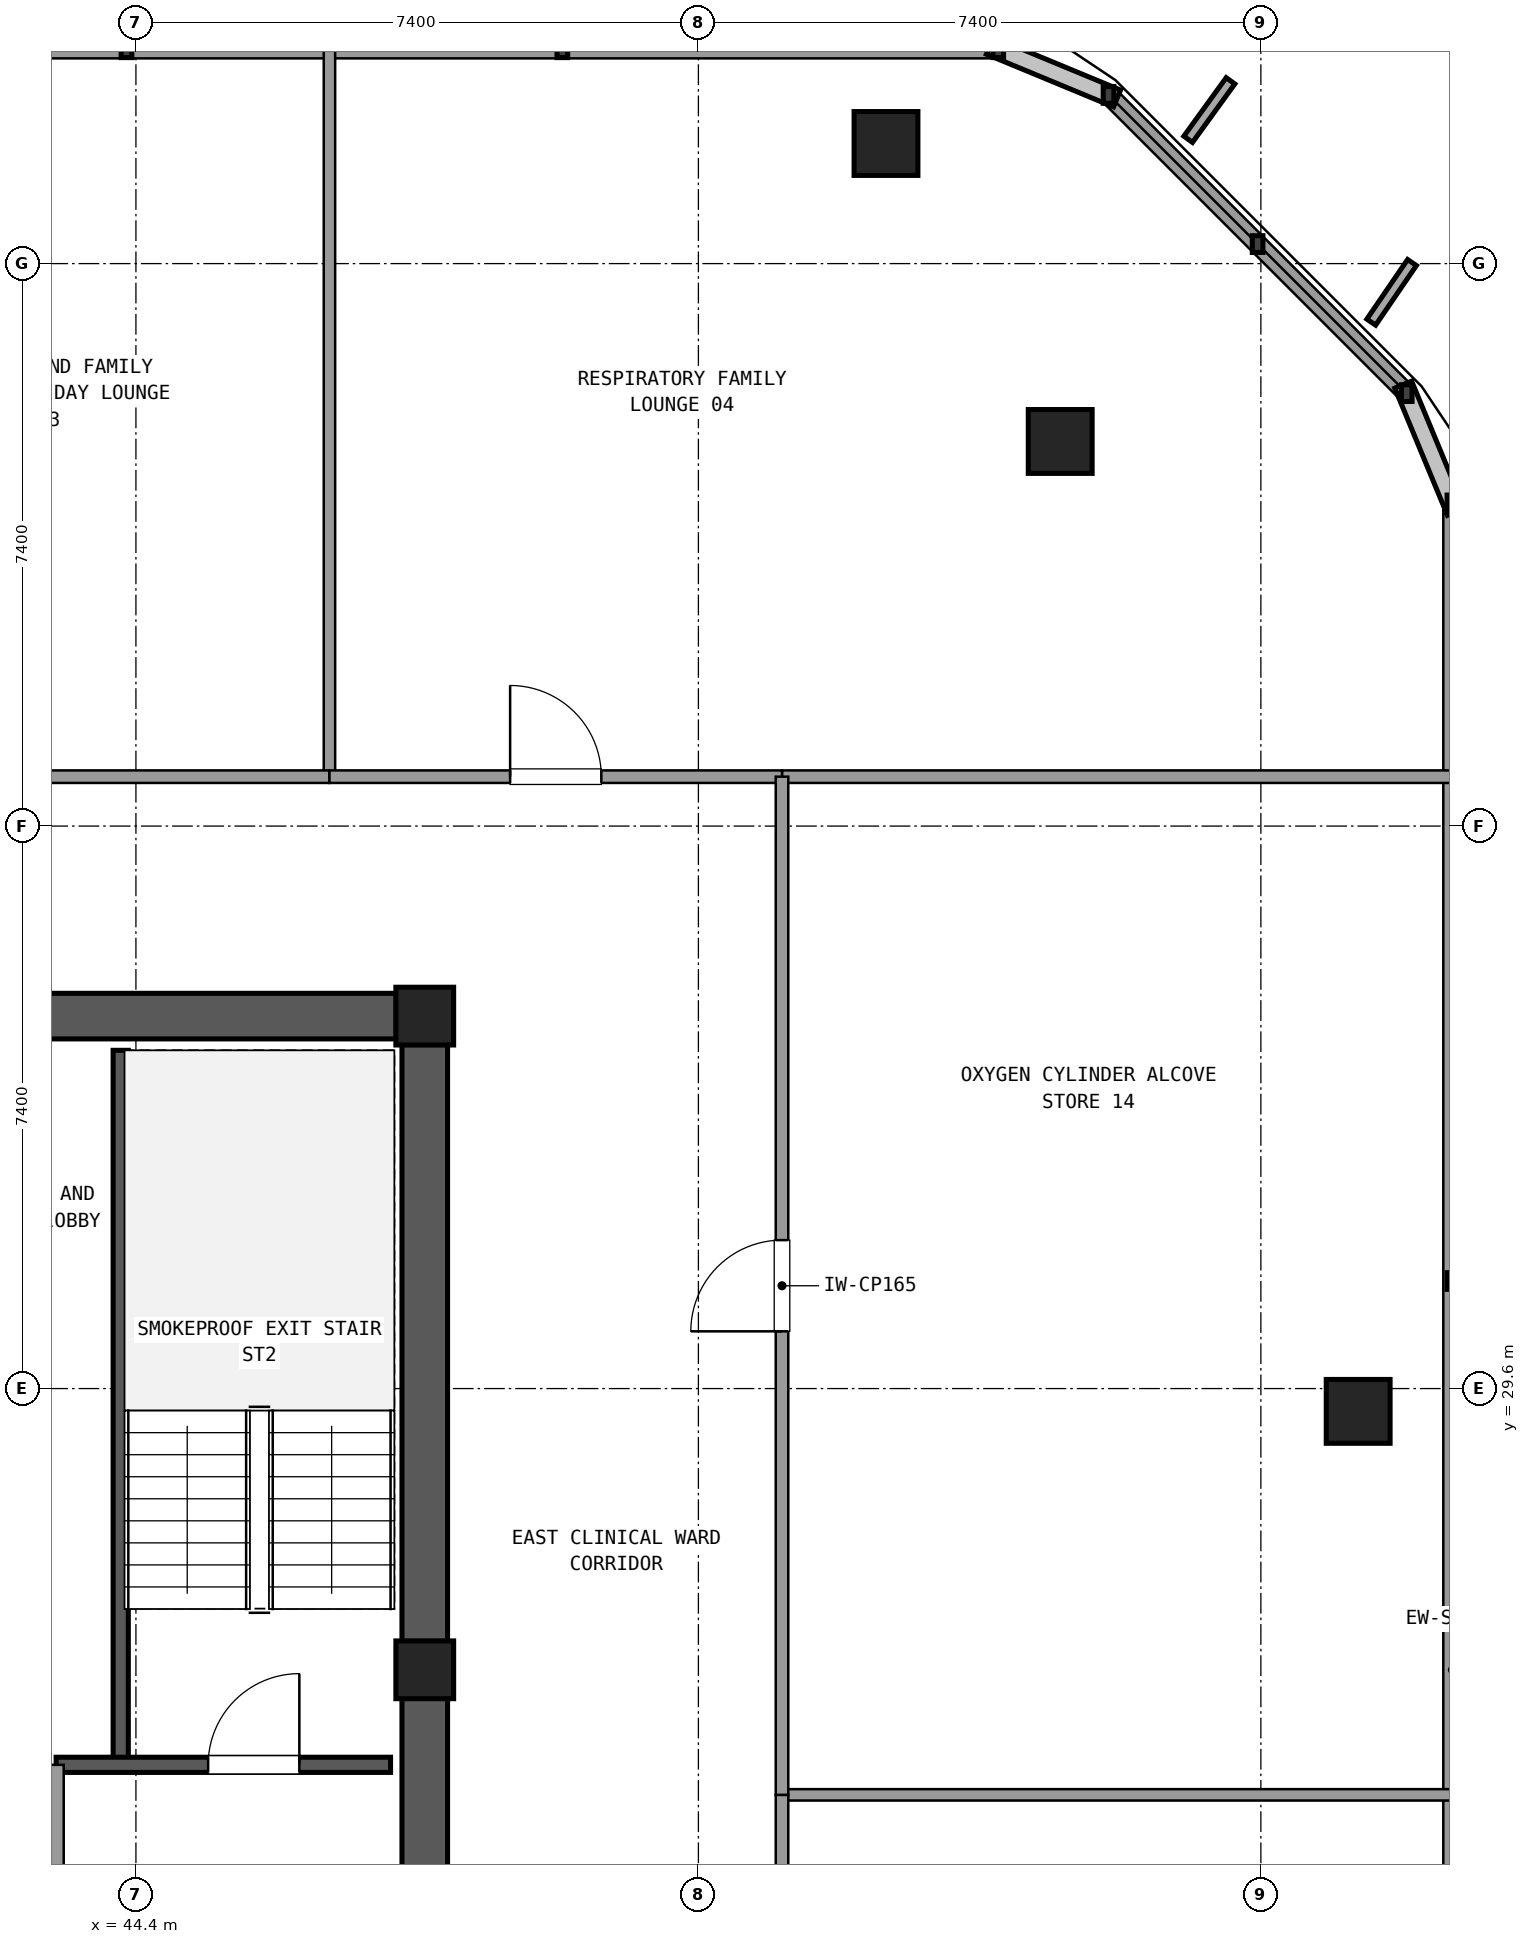
"""IFC4 building model, lengths in metres.
Left out: names, types, materials, properties, quantities, classifications, styles, units other than length and angle.
Written with IfcOpenShell. Run it as: python <this file> out.ifc"""

import sys

from ifc_helpers import new_model, si_unit, direction, frame, frame_2d, origin, origin_2d, place, context, subcontext, project, spatial, rectangle, extrude, element, fill, save


model = new_model("IFC4")
c1 = context("Model", 3, precision=1e-05, world=origin(), true_north=direction((0.0, 1.0)))
c2 = subcontext(c1, "Body", "Model", "MODEL_VIEW")
j1 = project(units=[si_unit("LENGTHUNIT", "METRE"), si_unit("PLANEANGLEUNIT", "RADIAN")], contexts=[c1])
p1 = place(None, origin())
s1 = spatial("IfcSite", under=j1, at=p1, CompositionType="ELEMENT")
p2 = place(p1, origin())
s2 = spatial("IfcBuilding", under=s1, at=p2, CompositionType="ELEMENT")
p3 = place(p2, frame((0.0, 0.0, 268.02)))
s3 = spatial("IfcBuildingStorey", under=s2, at=p3, CompositionType="ELEMENT", Elevation=268.02)
for number, where, z_axis, x_axis in (
    (1, (48.2, 25.9, 0.0), (0.0, 0.0, 1.0), (1.0, 0.0, 0.0)),
    (2, (48.2, 34.5, 0.0), (0.0, 0.0, 1.0), (1.0, 0.0, 0.0)),
):
    element("IfcColumn", number, at=place(p3, frame(where, z_axis=z_axis, x_axis=x_axis)), inside=s3, PredefinedType="COLUMN", context=c2, shape_type="SweptSolid", body=[
        extrude(rectangle(XDim=0.76, YDim=0.76, at=origin_2d()), origin(), (0.0, 0.0, 1.0), 3.6),
    ])
p4 = place(p3, frame((48.2, 17.675, 0.0), z_axis=(0.0, 0.0, 1.0), x_axis=(0.0, 1.0, 0.0)))
e3 = element("IfcWall", 3, at=p4, inside=s3, PredefinedType="SHEAR", context=c2, shape_type="SweptSolid", body=[
    extrude(rectangle(XDim=7.85, YDim=0.6, at=frame_2d((3.925, 0.0))), origin(), (0.0, 0.0, 1.0), 3.32),
])
p5 = place(p4, frame((4.375, 0.0, 0.0)))
e4 = element("IfcOpeningElement", 4, at=p5, cuts=e3, PredefinedType="OPENING", context=c2, shape_type="SweptSolid", body=[
    extrude(rectangle(XDim=1.2, YDim=2.15, at=frame_2d((0.6, 1.075))), frame((0.0, 0.31, 0.0), z_axis=(0.0, -1.0, 0.0), x_axis=(1.0, 0.0, 0.0)), (0.0, 0.0, 1.0), 0.62),
])
p6 = place(p3, frame((48.2, 26.275, 0.0), z_axis=(0.0, 0.0, 1.0), x_axis=(0.0, 1.0, 0.0)))
e5 = element("IfcWall", 5, at=p6, inside=s3, PredefinedType="SHEAR", context=c2, shape_type="SweptSolid", body=[
    extrude(rectangle(XDim=7.85, YDim=0.6, at=frame_2d((3.925, 0.0))), origin(), (0.0, 0.0, 1.0), 3.32),
])
p7 = place(p3, frame((47.825, 34.5, 0.0), z_axis=(0.0, 0.0, 1.0), x_axis=(-1.0, 0.0, 0.0)))
e6 = element("IfcWall", 6, at=p7, inside=s3, PredefinedType="SHEAR", context=c2, shape_type="SweptSolid", body=[
    extrude(rectangle(XDim=10.45, YDim=0.6, at=frame_2d((5.225, 0.0))), origin(), (0.0, 0.0, 1.0), 3.32),
])
p8 = place(p7, frame((4.725, 0.0, 0.0)))
e7 = element("IfcOpeningElement", 7, at=p8, cuts=e6, PredefinedType="OPENING", context=c2, shape_type="SweptSolid", body=[
    extrude(rectangle(XDim=1.6, YDim=2.2, at=frame_2d((0.8, 1.1))), frame((0.0, 0.31, 0.0), z_axis=(0.0, -1.0, 0.0), x_axis=(1.0, 0.0, 0.0)), (0.0, 0.0, 1.0), 0.62),
])
for number, where, z_axis, x_axis in (
    (8, (60.48, 29.3, 0.0), (0.0, 0.0, 1.0), (1.0, 0.0, 0.0)),
    (9, (56.56, 42.06, 0.0), (0.0, 0.0, 1.0), (1.0, 0.0, 0.0)),
    (10, (54.268, 45.98, 0.0), (0.0, 0.0, 1.0), (1.0, 0.0, 0.0)),
):
    element("IfcColumn", number, at=place(p3, frame(where, z_axis=z_axis, x_axis=x_axis)), inside=s3, PredefinedType="COLUMN", context=c2, shape_type="SweptSolid", body=[
        extrude(rectangle(XDim=0.84, YDim=0.84, at=origin_2d()), origin(), (0.0, 0.0, 1.0), 3.6),
    ])
p9 = place(p3, frame((61.72, 10.555, 0.0), z_axis=(0.0, 0.0, 1.0), x_axis=(0.0, 1.0, 0.0)))
e11 = element("IfcWall", 11, at=p9, inside=s3, PredefinedType="SOLIDWALL", context=c2, shape_type="SweptSolid", body=[
    extrude(rectangle(XDim=30.69, YDim=0.24, at=frame_2d((15.345, 0.0))), origin(), (0.0, 0.0, 1.0), 0.85),
])
p10 = place(p3, frame((61.119, 42.696, 0.0), z_axis=(0.0, 0.0, 1.0), x_axis=(-0.707106781187, 0.707106781187, 0.0)))
e12 = element("IfcWall", 12, at=p10, inside=s3, PredefinedType="SOLIDWALL", context=c2, shape_type="SweptSolid", body=[
    extrude(rectangle(XDim=5.548, YDim=0.24, at=frame_2d((2.774, 0.0))), origin(), (0.0, 0.0, 1.0), 0.85),
])
p11 = place(p3, frame((55.745, 47.22, 0.0), z_axis=(0.0, 0.0, 1.0), x_axis=(-1.0, 0.0, 0.0)))
e13 = element("IfcWall", 13, at=p11, inside=s3, PredefinedType="SOLIDWALL", context=c2, shape_type="SweptSolid", body=[
    extrude(rectangle(XDim=17.204, YDim=0.24, at=frame_2d((8.602, 0.0))), origin(), (0.0, 0.0, 1.0), 0.85),
])
p12 = place(p3, frame((44.2, 24.65, 0.0), z_axis=(0.0, 0.0, 1.0), x_axis=(0.0, 1.0, 0.0)))
e14 = element("IfcWall", 14, at=p12, inside=s3, PredefinedType="SHEAR", context=c2, shape_type="SweptSolid", body=[
    extrude(rectangle(XDim=9.4, YDim=0.2, at=frame_2d((4.7, 0.0))), origin(), (0.0, 0.0, 1.0), 3.32),
])
p13 = place(p3, frame((43.35, 24.65, 0.0), z_axis=(0.0, 0.0, 1.0), x_axis=(1.0, 0.0, 0.0)))
e15 = element("IfcWall", 15, at=p13, inside=s3, PredefinedType="SHEAR", context=c2, shape_type="SweptSolid", body=[
    extrude(rectangle(XDim=4.4, YDim=0.2, at=frame_2d((2.2, 0.0))), origin(), (0.0, 0.0, 1.0), 3.32),
])
p14 = place(p13, frame((2.0, 0.0, 0.0)))
e16 = element("IfcOpeningElement", 16, at=p14, cuts=e15, PredefinedType="OPENING", context=c2, shape_type="SweptSolid", body=[
    extrude(rectangle(XDim=1.2, YDim=2.15, at=frame_2d((0.6, 1.075))), frame((0.0, 0.11, 0.0), z_axis=(0.0, -1.0, 0.0), x_axis=(1.0, 0.0, 0.0)), (0.0, 0.0, 1.0), 0.22),
])
p15 = place(p3, frame((43.35, 17.75, 0.0), z_axis=(0.0, 0.0, 1.0), x_axis=(0.0, 1.0, 0.0)))
e17 = element("IfcWall", 17, at=p15, inside=s3, PredefinedType="SOLIDWALL", context=c2, shape_type="SweptSolid", body=[
    extrude(rectangle(XDim=6.9, YDim=0.2, at=frame_2d((3.45, 0.0))), origin(), (0.0, 0.0, 1.0), 2.61),
])
p16 = place(p15, frame((4.15, 0.0, 0.0)))
e18 = element("IfcOpeningElement", 18, at=p16, cuts=e17, PredefinedType="OPENING", context=c2, shape_type="SweptSolid", body=[
    extrude(rectangle(XDim=1.2, YDim=2.15, at=frame_2d((0.6, 1.075))), frame((0.0, 0.11, 0.0), z_axis=(0.0, -1.0, 0.0), x_axis=(1.0, 0.0, 0.0)), (0.0, 0.0, 1.0), 0.22),
])
p17 = place(p3, frame((52.9, 37.65, 0.0), z_axis=(0.0, 0.0, 1.0), x_axis=(1.0, 0.0, 0.0)))
e19 = element("IfcWall", 19, at=p17, inside=s3, PredefinedType="PARTITIONING", context=c2, shape_type="SweptSolid", body=[
    extrude(rectangle(XDim=8.8, YDim=0.165, at=frame_2d((4.4, 0.0))), origin(), (0.0, 0.0, 1.0), 2.61),
])
p18 = place(p3, frame((46.946, 37.65, 0.0), z_axis=(0.0, 0.0, 1.0), x_axis=(0.0, 1.0, 0.0)))
e20 = element("IfcWall", 20, at=p18, inside=s3, PredefinedType="PARTITIONING", context=c2, shape_type="SweptSolid", body=[
    extrude(rectangle(XDim=9.55, YDim=0.15, at=frame_2d((4.775, 0.0))), origin(), (0.0, 0.0, 1.0), 2.61),
])
p19 = place(p3, frame((35.2, 37.65, 0.0), z_axis=(0.0, 0.0, 1.0), x_axis=(1.0, 0.0, 0.0)))
e21 = element("IfcWall", 21, at=p19, inside=s3, PredefinedType="PARTITIONING", context=c2, shape_type="SweptSolid", body=[
    extrude(rectangle(XDim=11.746, YDim=0.165, at=frame_2d((5.873, 0.0))), origin(), (0.0, 0.0, 1.0), 2.61),
])
p20 = place(p19, frame((5.273, 0.0, 0.0)))
e22 = element("IfcOpeningElement", 22, at=p20, cuts=e21, PredefinedType="OPENING", context=c2, shape_type="SweptSolid", body=[
    extrude(rectangle(XDim=1.2, YDim=2.15, at=frame_2d((0.6, 1.075))), frame((0.0, 0.093, 0.0), z_axis=(0.0, -1.0, 0.0), x_axis=(1.0, 0.0, 0.0)), (0.0, 0.0, 1.0), 0.185),
])
p21 = place(p3, frame((46.946, 37.65, 0.0), z_axis=(0.0, 0.0, 1.0), x_axis=(1.0, 0.0, 0.0)))
e23 = element("IfcWall", 23, at=p21, inside=s3, PredefinedType="PARTITIONING", context=c2, shape_type="SweptSolid", body=[
    extrude(rectangle(XDim=5.954, YDim=0.165, at=frame_2d((2.977, 0.0))), origin(), (0.0, 0.0, 1.0), 2.61),
])
p22 = place(p21, frame((2.377, 0.0, 0.0)))
e24 = element("IfcOpeningElement", 24, at=p22, cuts=e23, PredefinedType="OPENING", context=c2, shape_type="SweptSolid", body=[
    extrude(rectangle(XDim=1.2, YDim=2.15, at=frame_2d((0.6, 1.075))), frame((0.0, 0.093, 0.0), z_axis=(0.0, -1.0, 0.0), x_axis=(1.0, 0.0, 0.0)), (0.0, 0.0, 1.0), 0.185),
])
p23 = place(p3, frame((52.9, 24.255, 0.0), z_axis=(0.0, 0.0, 1.0), x_axis=(1.0, 0.0, 0.0)))
e25 = element("IfcWall", 25, at=p23, inside=s3, PredefinedType="PARTITIONING", context=c2, shape_type="SweptSolid", body=[
    extrude(rectangle(XDim=8.8, YDim=0.15, at=frame_2d((4.4, 0.0))), origin(), (0.0, 0.0, 1.0), 2.61),
])
p24 = place(p3, frame((52.9, 14.15, 0.0), z_axis=(0.0, 0.0, 1.0), x_axis=(0.0, 1.0, 0.0)))
e26 = element("IfcWall", 26, at=p24, inside=s3, PredefinedType="PARTITIONING", context=c2, shape_type="SweptSolid", body=[
    extrude(rectangle(XDim=10.105, YDim=0.165, at=frame_2d((5.052, 0.0))), origin(), (0.0, 0.0, 1.0), 2.61),
])
p25 = place(p24, frame((4.452, 0.0, 0.0)))
e27 = element("IfcOpeningElement", 27, at=p25, cuts=e26, PredefinedType="OPENING", context=c2, shape_type="SweptSolid", body=[
    extrude(rectangle(XDim=1.2, YDim=2.15, at=frame_2d((0.6, 1.075))), frame((0.0, 0.093, 0.0), z_axis=(0.0, -1.0, 0.0), x_axis=(1.0, 0.0, 0.0)), (0.0, 0.0, 1.0), 0.185),
])
p26 = place(p3, frame((52.9, 24.255, 0.0), z_axis=(0.0, 0.0, 1.0), x_axis=(0.0, 1.0, 0.0)))
e28 = element("IfcWall", 28, at=p26, inside=s3, PredefinedType="PARTITIONING", context=c2, shape_type="SweptSolid", body=[
    extrude(rectangle(XDim=13.395, YDim=0.165, at=frame_2d((6.698, 0.0))), origin(), (0.0, 0.0, 1.0), 2.61),
])
p27 = place(p26, frame((6.098, 0.0, 0.0)))
e29 = element("IfcOpeningElement", 29, at=p27, cuts=e28, PredefinedType="OPENING", context=c2, shape_type="SweptSolid", body=[
    extrude(rectangle(XDim=1.2, YDim=2.15, at=frame_2d((0.6, 1.075))), frame((0.0, 0.093, 0.0), z_axis=(0.0, -1.0, 0.0), x_axis=(1.0, 0.0, 0.0)), (0.0, 0.0, 1.0), 0.185),
])
p28 = place(p14, origin())
e30 = element("IfcDoor", 30, at=p28, inside=s3, OperationType="SINGLE_SWING_RIGHT", PredefinedType="DOOR", context=c2, shape_type="SweptSolid", body=[
    extrude(rectangle(XDim=1.2, YDim=2.15, at=frame_2d((0.6, 1.075))), frame((0.0, 0.025, 0.0), z_axis=(0.0, -1.0, 0.0), x_axis=(1.0, 0.0, 0.0)), (0.0, 0.0, 1.0), 0.05),
])
fill(e16, e30)
p29 = place(p22, origin())
e31 = element("IfcDoor", 31, at=p29, inside=s3, OperationType="SINGLE_SWING_LEFT", PredefinedType="DOOR", context=c2, shape_type="SweptSolid", body=[
    extrude(rectangle(XDim=1.2, YDim=2.15, at=frame_2d((0.6, 1.075))), frame((0.0, 0.025, 0.0), z_axis=(0.0, -1.0, 0.0), x_axis=(1.0, 0.0, 0.0)), (0.0, 0.0, 1.0), 0.05),
])
fill(e24, e31)
p30 = place(p27, origin())
e32 = element("IfcDoor", 32, at=p30, inside=s3, OperationType="SINGLE_SWING_LEFT", PredefinedType="DOOR", context=c2, shape_type="SweptSolid", body=[
    extrude(rectangle(XDim=1.2, YDim=2.15, at=frame_2d((0.6, 1.075))), frame((0.0, 0.025, 0.0), z_axis=(0.0, -1.0, 0.0), x_axis=(1.0, 0.0, 0.0)), (0.0, 0.0, 1.0), 0.05),
])
fill(e29, e32)
save(model, sys.argv[1])
